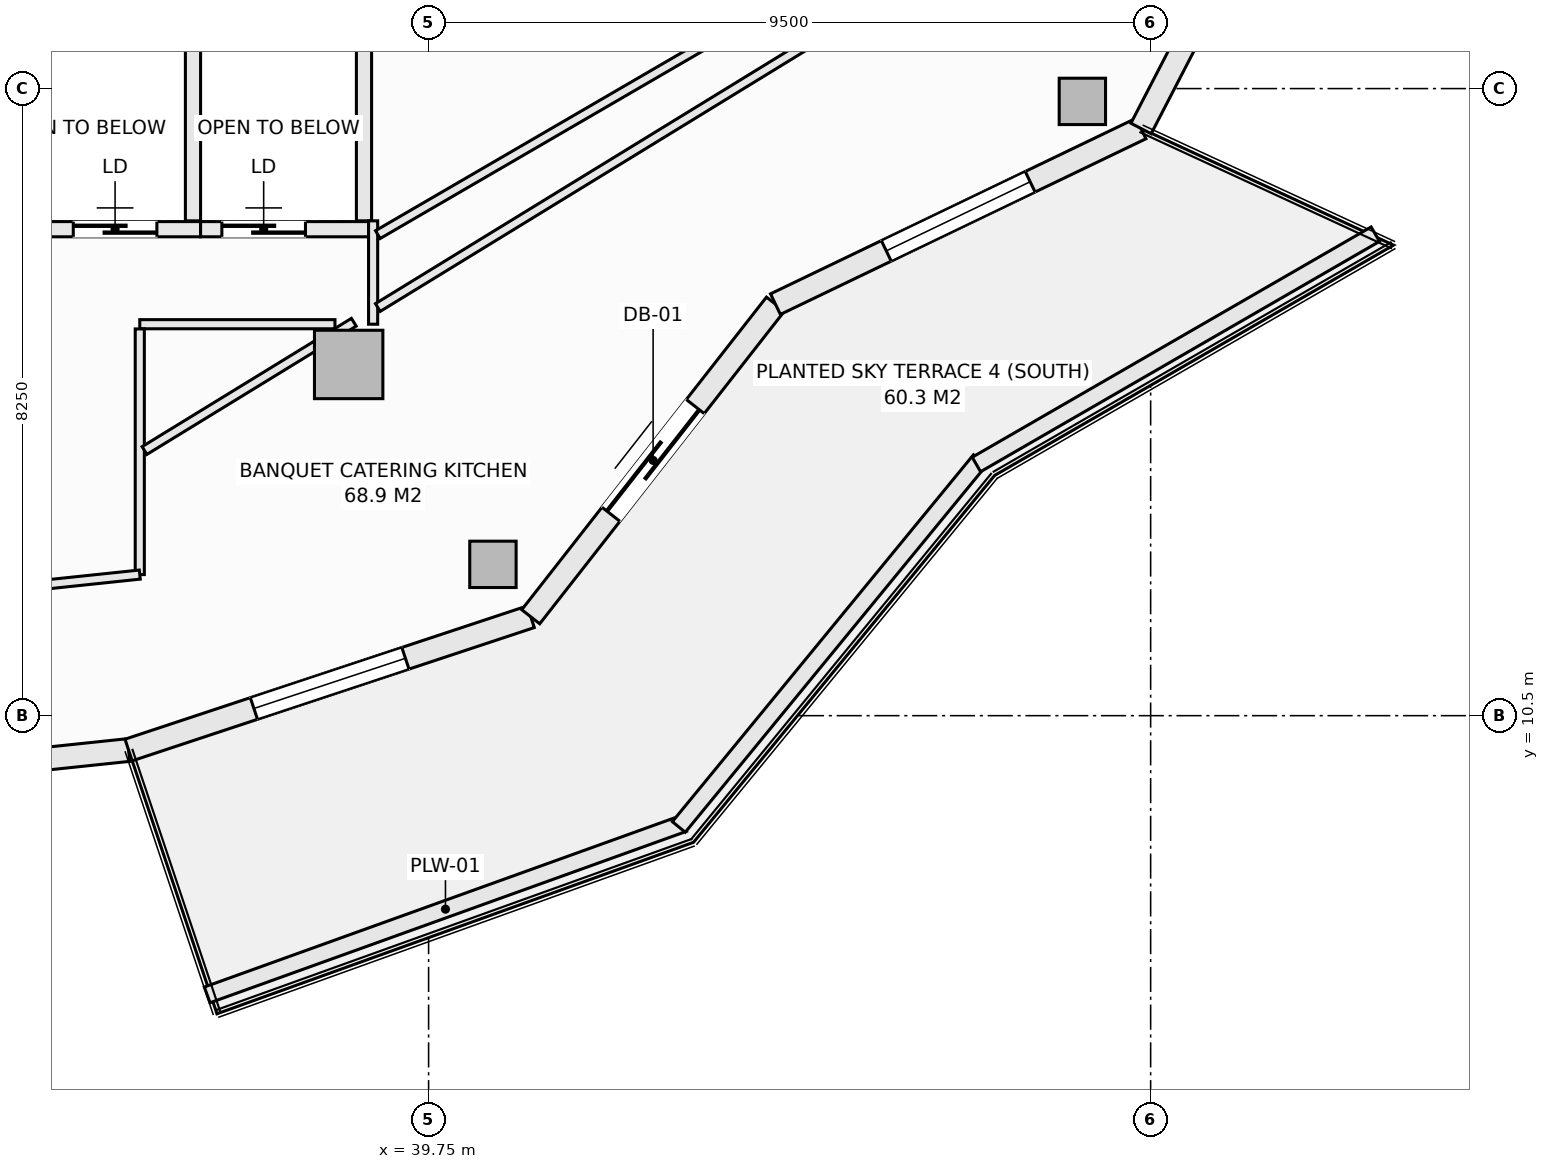
"""IFC4 building model, lengths in metres.
Left out: names, types, materials, properties, quantities, classifications, styles, units other than length and angle.
Written with IfcOpenShell. Run it as: python <this file> out.ifc"""

import sys

from ifc_helpers import new_model, si_unit, direction, frame, frame_2d, origin, origin_2d, place, context, subcontext, project, spatial, rectangle, hollow_rectangle, extrude, element, fill, save


model = new_model("IFC4")
c1 = context("Model", 3, precision=1e-05, world=origin(), true_north=direction((0.0, 1.0)))
c2 = subcontext(c1, "Body", "Model", "MODEL_VIEW")
j1 = project(units=[si_unit("LENGTHUNIT", "METRE"), si_unit("PLANEANGLEUNIT", "RADIAN")], contexts=[c1])
p1 = place(None, origin())
s1 = spatial("IfcSite", under=j1, at=p1, CompositionType="ELEMENT")
p2 = place(p1, origin())
s2 = spatial("IfcBuilding", under=s1, at=p2, CompositionType="ELEMENT")
p3 = place(p2, frame((0.0, 0.0, 146.1)))
s3 = spatial("IfcBuildingStorey", under=s2, at=p3, CompositionType="ELEMENT", Elevation=146.1)
for number, where, z_axis, x_axis in (
    (1, (40.596, 12.49, -0.27), (0.0, 0.0, 1.0), (1.0, 0.0, 0.0)),
    (2, (48.352, 18.581, -0.27), (0.0, 0.0, 1.0), (1.0, 0.0, 0.0)),
):
    element("IfcColumn", number, at=place(p3, frame(where, z_axis=z_axis, x_axis=x_axis)), inside=s3, PredefinedType="COLUMN", context=c2, shape_type="SweptSolid", body=[
        extrude(hollow_rectangle(XDim=0.61, YDim=0.61, WallThickness=0.025, at=origin_2d()), origin(), (0.0, 0.0, 1.0), 3.4),
    ])
p4 = place(p3, frame((38.698, 15.121, -0.27), z_axis=(0.0, 0.0, 1.0), x_axis=(1.0, 0.0, 0.0)))
e3 = element("IfcColumn", 3, at=p4, inside=s3, PredefinedType="COLUMN", context=c2, shape_type="SweptSolid", body=[
    extrude(rectangle(XDim=0.9, YDim=0.9, at=origin_2d()), origin(), (0.0, 0.0, 1.0), 3.4),
])
p5 = place(p3, frame((30.125, 9.45, 0.0), z_axis=(0.0, 0.0, 1.0), x_axis=(0.994496545245, 0.104769372887, 0.0)))
e4 = element("IfcWall", 4, at=p5, inside=s3, PredefinedType="SOLIDWALL", context=c2, shape_type="SweptSolid", body=[
    extrude(rectangle(XDim=5.709, YDim=0.3, at=frame_2d((2.854, 0.0))), origin(), (0.0, 0.0, 1.0), 2.653),
])
p6 = place(p5, frame((1.805, 0.0, 0.74)))
e5 = element("IfcOpeningElement", 5, at=p6, cuts=e4, PredefinedType="OPENING", context=c2, shape_type="SweptSolid", body=[
    extrude(rectangle(XDim=2.1, YDim=1.7, at=frame_2d((1.05, 0.85))), frame((0.0, 0.16, 0.0), z_axis=(0.0, -1.0, 0.0), x_axis=(1.0, 0.0, 0.0)), (0.0, 0.0, 1.0), 0.32),
])
p7 = place(p3, frame((35.803, 10.048, 0.0), z_axis=(0.0, 0.0, 1.0), x_axis=(0.949246811547, 0.314532177636, 0.0)))
e6 = element("IfcWall", 6, at=p7, inside=s3, PredefinedType="SOLIDWALL", context=c2, shape_type="SweptSolid", body=[
    extrude(rectangle(XDim=5.574, YDim=0.3, at=frame_2d((2.787, 0.0))), origin(), (0.0, 0.0, 1.0), 2.653),
])
p8 = place(p7, frame((1.737, 0.0, 0.74)))
e7 = element("IfcOpeningElement", 7, at=p8, cuts=e6, PredefinedType="OPENING", context=c2, shape_type="SweptSolid", body=[
    extrude(rectangle(XDim=2.1, YDim=1.7, at=frame_2d((1.05, 0.85))), frame((0.0, 0.16, 0.0), z_axis=(0.0, -1.0, 0.0), x_axis=(1.0, 0.0, 0.0)), (0.0, 0.0, 1.0), 0.32),
])
p9 = place(p3, frame((41.094, 11.801, 0.0), z_axis=(0.0, 0.0, 1.0), x_axis=(0.616429245738, 0.787410302828, 0.0)))
e8 = element("IfcWall", 8, at=p9, inside=s3, PredefinedType="SOLIDWALL", context=c2, shape_type="SweptSolid", body=[
    extrude(rectangle(XDim=5.223, YDim=0.3, at=frame_2d((2.612, 0.0))), origin(), (0.0, 0.0, 1.0), 2.653),
])
p10 = place(p9, frame((1.712, 0.0, 0.0)))
e9 = element("IfcOpeningElement", 9, at=p10, cuts=e8, PredefinedType="OPENING", context=c2, shape_type="SweptSolid", body=[
    extrude(rectangle(XDim=1.8, YDim=2.25, at=frame_2d((0.9, 1.125))), frame((0.0, 0.16, 0.0), z_axis=(0.0, -1.0, 0.0), x_axis=(1.0, 0.0, 0.0)), (0.0, 0.0, 1.0), 0.32),
])
p11 = place(p3, frame((44.313, 15.914, 0.0), z_axis=(0.0, 0.0, 1.0), x_axis=(0.901353070301, 0.433085029363, 0.0)))
e10 = element("IfcWall", 10, at=p11, inside=s3, PredefinedType="SOLIDWALL", context=c2, shape_type="SweptSolid", body=[
    extrude(rectangle(XDim=5.336, YDim=0.3, at=frame_2d((2.668, 0.0))), origin(), (0.0, 0.0, 1.0), 2.653),
])
p12 = place(p11, frame((1.618, 0.0, 0.74)))
e11 = element("IfcOpeningElement", 11, at=p12, cuts=e10, PredefinedType="OPENING", context=c2, shape_type="SweptSolid", body=[
    extrude(rectangle(XDim=2.1, YDim=1.7, at=frame_2d((1.05, 0.85))), frame((0.0, 0.16, 0.0), z_axis=(0.0, -1.0, 0.0), x_axis=(1.0, 0.0, 0.0)), (0.0, 0.0, 1.0), 0.32),
])
p13 = place(p3, frame((49.123, 18.225, 0.0), z_axis=(0.0, 0.0, 1.0), x_axis=(0.459810251451, 0.888017191647, 0.0)))
e12 = element("IfcWall", 12, at=p13, inside=s3, PredefinedType="SOLIDWALL", context=c2, shape_type="SweptSolid", body=[
    extrude(rectangle(XDim=4.766, YDim=0.3, at=frame_2d((2.383, 0.0))), origin(), (0.0, 0.0, 1.0), 2.653),
])
p14 = place(p13, frame((1.333, 0.0, 0.74)))
e13 = element("IfcOpeningElement", 13, at=p14, cuts=e12, PredefinedType="OPENING", context=c2, shape_type="SweptSolid", body=[
    extrude(rectangle(XDim=2.1, YDim=1.7, at=frame_2d((1.05, 0.85))), frame((0.0, 0.16, 0.0), z_axis=(0.0, -1.0, 0.0), x_axis=(1.0, 0.0, 0.0)), (0.0, 0.0, 1.0), 0.32),
])
p15 = place(p3, frame((36.837, 6.826, 0.0), z_axis=(0.0, 0.0, 1.0), x_axis=(0.940948576924, 0.338549517184, 0.0)))
e14 = element("IfcWall", 14, at=p15, inside=s3, PredefinedType="PARAPET", context=c2, shape_type="SweptSolid", body=[
    extrude(rectangle(XDim=6.664, YDim=0.22, at=frame_2d((3.332, 0.0))), origin(), (0.0, 0.0, 1.0), 0.52),
])
p16 = place(p3, frame((43.042, 9.036, 0.0), z_axis=(0.0, 0.0, 1.0), x_axis=(0.634429234628, 0.77298094818, 0.0)))
e15 = element("IfcWall", 15, at=p16, inside=s3, PredefinedType="PARAPET", context=c2, shape_type="SweptSolid", body=[
    extrude(rectangle(XDim=6.245, YDim=0.22, at=frame_2d((3.123, 0.0))), origin(), (0.0, 0.0, 1.0), 0.52),
])
p17 = place(p3, frame((46.958, 13.805, 0.0), z_axis=(0.0, 0.0, 1.0), x_axis=(0.866058128659, 0.499943314571, 0.0)))
e16 = element("IfcWall", 16, at=p17, inside=s3, PredefinedType="PARAPET", context=c2, shape_type="SweptSolid", body=[
    extrude(rectangle(XDim=6.06, YDim=0.22, at=frame_2d((3.03, 0.0))), origin(), (0.0, 0.0, 1.0), 0.52),
])
p18 = place(p3, frame((34.5, 16.9, 0.0), z_axis=(0.0, 0.0, 1.0), x_axis=(1.0, 0.0, 0.0)))
e17 = element("IfcWall", 17, at=p18, inside=s3, PredefinedType="SOLIDWALL", context=c2, shape_type="SweptSolid", body=[
    extrude(rectangle(XDim=2.25, YDim=0.2, at=frame_2d((1.125, 0.0))), origin(), (0.0, 0.0, 1.0), 3.13),
])
p19 = place(p18, frame((0.575, 0.0, 0.0)))
e18 = element("IfcOpeningElement", 18, at=p19, cuts=e17, PredefinedType="OPENING", context=c2, shape_type="SweptSolid", body=[
    extrude(rectangle(XDim=1.1, YDim=2.2, at=frame_2d((0.55, 1.1))), frame((0.0, 0.11, 0.0), z_axis=(0.0, -1.0, 0.0), x_axis=(1.0, 0.0, 0.0)), (0.0, 0.0, 1.0), 0.22),
])
p20 = place(p3, frame((36.65, 17.01, 0.0), z_axis=(0.0, 0.0, 1.0), x_axis=(0.0, 1.0, 0.0)))
e19 = element("IfcWall", 19, at=p20, inside=s3, PredefinedType="SOLIDWALL", context=c2, shape_type="SweptSolid", body=[
    extrude(rectangle(XDim=2.43, YDim=0.2, at=frame_2d((1.215, 0.0))), origin(), (0.0, 0.0, 1.0), 3.13),
])
p21 = place(p3, frame((36.75, 16.9, 0.0), z_axis=(0.0, 0.0, 1.0), x_axis=(1.0, 0.0, 0.0)))
e20 = element("IfcWall", 20, at=p21, inside=s3, PredefinedType="SOLIDWALL", context=c2, shape_type="SweptSolid", body=[
    extrude(rectangle(XDim=2.25, YDim=0.2, at=frame_2d((1.125, 0.0))), origin(), (0.0, 0.0, 1.0), 3.13),
])
p22 = place(p21, frame((0.28, 0.0, 0.0)))
e21 = element("IfcOpeningElement", 21, at=p22, cuts=e20, PredefinedType="OPENING", context=c2, shape_type="SweptSolid", body=[
    extrude(rectangle(XDim=1.1, YDim=2.2, at=frame_2d((0.55, 1.1))), frame((0.0, 0.11, 0.0), z_axis=(0.0, -1.0, 0.0), x_axis=(1.0, 0.0, 0.0)), (0.0, 0.0, 1.0), 0.22),
])
p23 = place(p3, frame((38.9, 17.01, 0.0), z_axis=(0.0, 0.0, 1.0), x_axis=(0.0, 1.0, 0.0)))
e22 = element("IfcWall", 22, at=p23, inside=s3, PredefinedType="SOLIDWALL", context=c2, shape_type="SweptSolid", body=[
    extrude(rectangle(XDim=2.43, YDim=0.2, at=frame_2d((1.215, 0.0))), origin(), (0.0, 0.0, 1.0), 3.13),
])
p24 = place(p3, frame((39.02, 15.65, 0.0), z_axis=(0.0, 0.0, 1.0), x_axis=(0.0, 1.0, 0.0)))
e23 = element("IfcWall", 23, at=p24, inside=s3, PredefinedType="PARTITIONING", context=c2, shape_type="SweptSolid", body=[
    extrude(rectangle(XDim=1.36, YDim=0.12, at=frame_2d((0.68, 0.0))), origin(), (0.0, 0.0, 1.0), 2.505),
])
p25 = place(p3, frame((35.95, 15.65, 0.0), z_axis=(0.0, 0.0, 1.0), x_axis=(1.0, 0.0, 0.0)))
e24 = element("IfcWall", 24, at=p25, inside=s3, PredefinedType="PARTITIONING", context=c2, shape_type="SweptSolid", body=[
    extrude(rectangle(XDim=2.568, YDim=0.12, at=frame_2d((1.284, 0.0))), origin(), (0.0, 0.0, 1.0), 3.13),
])
p26 = place(p3, frame((35.95, 12.356, 0.0), z_axis=(0.0, 0.0, 1.0), x_axis=(0.0, 1.0, 0.0)))
e25 = element("IfcWall", 25, at=p26, inside=s3, PredefinedType="PARTITIONING", context=c2, shape_type="SweptSolid", body=[
    extrude(rectangle(XDim=3.232, YDim=0.12, at=frame_2d((1.616, 0.0))), origin(), (0.0, 0.0, 1.0), 3.13),
])
p27 = place(p3, frame((30.195, 11.75, 0.0), z_axis=(0.0, 0.0, 1.0), x_axis=(0.994502215954, 0.104715531139, 0.0)))
e26 = element("IfcWall", 26, at=p27, inside=s3, PredefinedType="PARTITIONING", context=c2, shape_type="SweptSolid", body=[
    extrude(rectangle(XDim=5.787, YDim=0.12, at=frame_2d((2.893, 0.0))), origin(), (0.0, 0.0, 1.0), 3.13),
])
p28 = place(p27, frame((3.369, 0.0, 0.0)))
e27 = element("IfcOpeningElement", 27, at=p28, cuts=e26, PredefinedType="OPENING", context=c2, shape_type="SweptSolid", body=[
    extrude(rectangle(XDim=0.95, YDim=2.1, at=frame_2d((0.475, 1.05))), frame((0.0, 0.07, 0.0), z_axis=(0.0, -1.0, 0.0), x_axis=(1.0, 0.0, 0.0)), (0.0, 0.0, 1.0), 0.14),
])
p29 = place(p3, frame((36.012, 13.988, 0.0), z_axis=(0.0, 0.0, 1.0), x_axis=(0.852640355982, 0.522498252008, 0.0)))
e28 = element("IfcWall", 28, at=p29, inside=s3, PredefinedType="PARTITIONING", context=c2, shape_type="SweptSolid", body=[
    extrude(rectangle(XDim=3.23, YDim=0.12, at=frame_2d((1.615, 0.0))), origin(), (0.0, 0.0, 1.0), 2.505),
])
p30 = place(p3, frame((39.082, 15.87, 0.0), z_axis=(0.0, 0.0, 1.0), x_axis=(0.852607858044, 0.522551280165, 0.0)))
e29 = element("IfcWall", 29, at=p30, inside=s3, PredefinedType="PARTITIONING", context=c2, shape_type="SweptSolid", body=[
    extrude(rectangle(XDim=14.342, YDim=0.12, at=frame_2d((7.171, 0.0))), origin(), (0.0, 0.0, 1.0), 2.505),
])
p31 = place(p3, frame((39.082, 16.829, 0.0), z_axis=(0.0, 0.0, 1.0), x_axis=(0.864565483681, 0.502520173155, 0.0)))
e30 = element("IfcWall", 30, at=p31, inside=s3, PredefinedType="PARTITIONING", context=c2, shape_type="SweptSolid", body=[
    extrude(rectangle(XDim=6.093, YDim=0.12, at=frame_2d((3.047, 0.0))), origin(), (0.0, 0.0, 1.0), 2.505),
])
p32 = place(p8, origin())
e31 = element("IfcWindow", 31, at=p32, inside=s3, PartitioningType="SINGLE_PANEL", PredefinedType="WINDOW", context=c2, shape_type="SweptSolid", body=[
    extrude(rectangle(XDim=2.1, YDim=1.7, at=frame_2d((1.05, 0.85))), frame((0.0, 0.03, 0.0), z_axis=(0.0, -1.0, 0.0), x_axis=(1.0, 0.0, 0.0)), (0.0, 0.0, 1.0), 0.06),
])
fill(e7, e31)
p33 = place(p10, frame((1.8, 0.0, 0.0), z_axis=(0.0, 0.0, 1.0), x_axis=(-1.0, 0.0, 0.0)))
e32 = element("IfcDoor", 32, at=p33, inside=s3, OperationType="SLIDING_TO_LEFT", PredefinedType="DOOR", context=c2, shape_type="SweptSolid", body=[
    extrude(rectangle(XDim=1.8, YDim=2.25, at=frame_2d((0.9, 1.125))), frame((0.0, 0.025, 0.0), z_axis=(0.0, -1.0, 0.0), x_axis=(1.0, 0.0, 0.0)), (0.0, 0.0, 1.0), 0.05),
])
fill(e9, e32)
p34 = place(p12, origin())
e33 = element("IfcWindow", 33, at=p34, inside=s3, PartitioningType="SINGLE_PANEL", PredefinedType="WINDOW", context=c2, shape_type="SweptSolid", body=[
    extrude(rectangle(XDim=2.1, YDim=1.7, at=frame_2d((1.05, 0.85))), frame((0.0, 0.03, 0.0), z_axis=(0.0, -1.0, 0.0), x_axis=(1.0, 0.0, 0.0)), (0.0, 0.0, 1.0), 0.06),
])
fill(e11, e33)
p35 = place(p19, origin())
e34 = element("IfcDoor", 34, at=p35, inside=s3, OperationType="SLIDING_TO_LEFT", PredefinedType="DOOR", context=c2, shape_type="SweptSolid", body=[
    extrude(rectangle(XDim=1.1, YDim=2.2, at=frame_2d((0.55, 1.1))), frame((0.0, 0.025, 0.0), z_axis=(0.0, -1.0, 0.0), x_axis=(1.0, 0.0, 0.0)), (0.0, 0.0, 1.0), 0.05),
])
fill(e18, e34)
p36 = place(p22, origin())
e35 = element("IfcDoor", 35, at=p36, inside=s3, OperationType="SLIDING_TO_LEFT", PredefinedType="DOOR", context=c2, shape_type="SweptSolid", body=[
    extrude(rectangle(XDim=1.1, YDim=2.2, at=frame_2d((0.55, 1.1))), frame((0.0, 0.025, 0.0), z_axis=(0.0, -1.0, 0.0), x_axis=(1.0, 0.0, 0.0)), (0.0, 0.0, 1.0), 0.05),
])
fill(e21, e35)
save(model, sys.argv[1])
